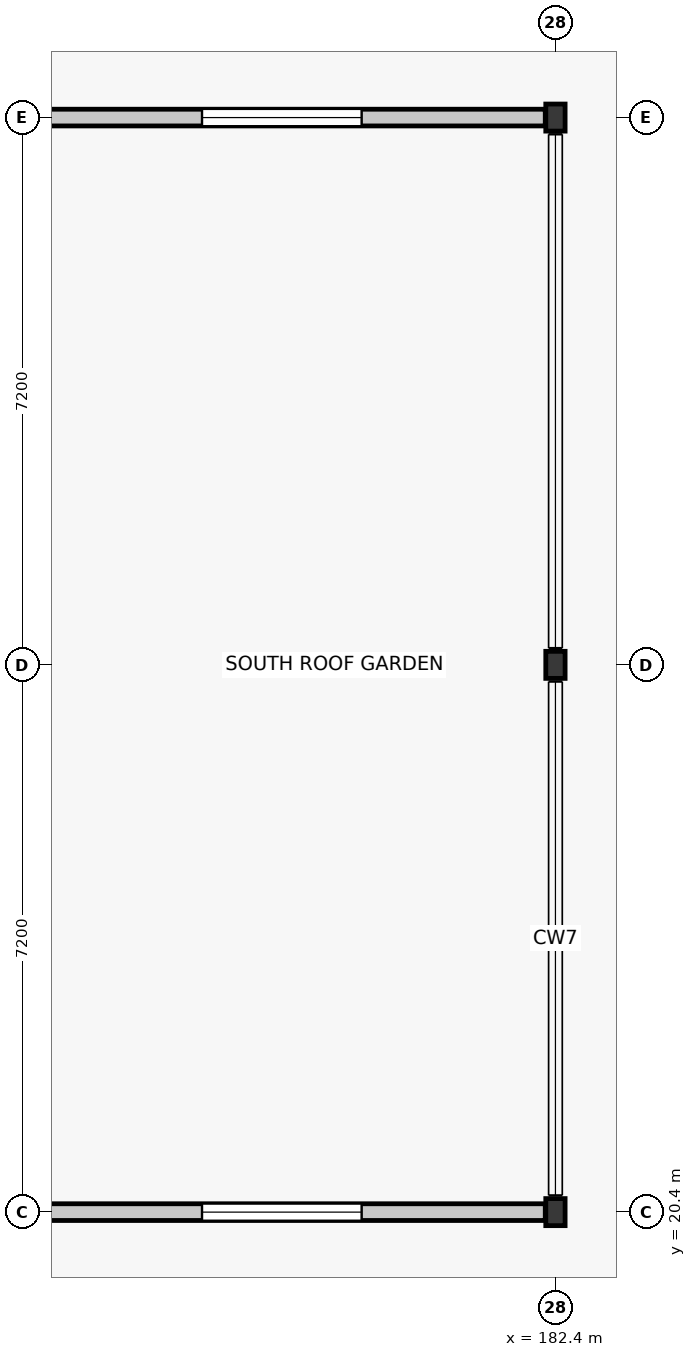
"""IFC4 building model, lengths in metres.
Left out: names, types, materials, properties, quantities, classifications, styles, units other than length and angle.
Written with IfcOpenShell. Run it as: python <this file> out.ifc"""

import sys

from ifc_helpers import new_model, si_unit, direction, frame, frame_2d, origin, origin_2d, place, context, subcontext, project, spatial, rectangle, i_section, extrude, element, fill, save


model = new_model("IFC4")
c1 = context("Model", 3, precision=1e-05, world=origin(), true_north=direction((0.0, 1.0)))
c2 = subcontext(c1, "Body", "Model", "MODEL_VIEW")
j1 = project(units=[si_unit("LENGTHUNIT", "METRE"), si_unit("PLANEANGLEUNIT", "RADIAN")], contexts=[c1])
p1 = place(None, origin())
s1 = spatial("IfcSite", under=j1, at=p1, CompositionType="ELEMENT")
p2 = place(p1, origin())
s2 = spatial("IfcBuilding", under=s1, at=p2, CompositionType="ELEMENT")
p3 = place(p2, frame((0.0, 0.0, 13.2)))
s3 = spatial("IfcBuildingStorey", under=s2, at=p3, CompositionType="ELEMENT", Elevation=13.2)
for number, where, z_axis, x_axis in (
    (1, (182.4, 20.4, 0.0), (0.0, 0.0, 1.0), (1.0, 0.0, 0.0)),
    (2, (182.4, 27.6, 0.0), (0.0, 0.0, 1.0), (1.0, 0.0, 0.0)),
    (3, (182.4, 34.8, 0.0), (0.0, 0.0, 1.0), (1.0, 0.0, 0.0)),
):
    element("IfcColumn", number, at=place(p3, frame(where, z_axis=z_axis, x_axis=x_axis)), inside=s3, PredefinedType="COLUMN", context=c2, shape_type="SweptSolid", body=[
        extrude(i_section(OverallWidth=0.254, OverallDepth=0.356, WebThickness=0.01, FlangeThickness=0.018, FilletRadius=0.015, at=origin_2d()), origin(), (0.0, 0.0, 1.0), 3.66),
    ])
p4 = place(p3, frame((182.266, 20.4, 0.0), z_axis=(0.0, 0.0, 1.0), x_axis=(-1.0, 0.0, 0.0)))
e4 = element("IfcWall", 4, at=p4, inside=s3, PredefinedType="STANDARD", context=c2, shape_type="SweptSolid", body=[
    extrude(rectangle(XDim=6.932, YDim=0.22, at=frame_2d((3.466, 0.0))), origin(), (0.0, 0.0, 1.0), 3.19),
])
p5 = place(p4, frame((2.416, 0.0, 0.95)))
e5 = element("IfcOpeningElement", 5, at=p5, cuts=e4, PredefinedType="OPENING", context=c2, shape_type="SweptSolid", body=[
    extrude(rectangle(XDim=2.1, YDim=1.5, at=frame_2d((1.05, 0.75))), frame((0.0, 0.12, 0.0), z_axis=(0.0, -1.0, 0.0), x_axis=(1.0, 0.0, 0.0)), (0.0, 0.0, 1.0), 0.24),
])
p6 = place(p3, frame((175.334, 34.8, 0.0), z_axis=(0.0, 0.0, 1.0), x_axis=(1.0, 0.0, 0.0)))
e6 = element("IfcWall", 6, at=p6, inside=s3, PredefinedType="STANDARD", context=c2, shape_type="SweptSolid", body=[
    extrude(rectangle(XDim=6.932, YDim=0.22, at=frame_2d((3.466, 0.0))), origin(), (0.0, 0.0, 1.0), 3.19),
])
p7 = place(p6, frame((2.416, 0.0, 0.95)))
e7 = element("IfcOpeningElement", 7, at=p7, cuts=e6, PredefinedType="OPENING", context=c2, shape_type="SweptSolid", body=[
    extrude(rectangle(XDim=2.1, YDim=1.5, at=frame_2d((1.05, 0.75))), frame((0.0, 0.12, 0.0), z_axis=(0.0, -1.0, 0.0), x_axis=(1.0, 0.0, 0.0)), (0.0, 0.0, 1.0), 0.24),
])
p8 = place(p5, origin())
e8 = element("IfcWindow", 8, at=p8, inside=s3, PartitioningType="SINGLE_PANEL", PredefinedType="WINDOW", context=c2, shape_type="SweptSolid", body=[
    extrude(rectangle(XDim=2.1, YDim=1.5, at=frame_2d((1.05, 0.75))), frame((0.0, 0.03, 0.0), z_axis=(0.0, -1.0, 0.0), x_axis=(1.0, 0.0, 0.0)), (0.0, 0.0, 1.0), 0.06),
])
fill(e5, e8)
p9 = place(p7, origin())
e9 = element("IfcWindow", 9, at=p9, inside=s3, PartitioningType="SINGLE_PANEL", PredefinedType="WINDOW", context=c2, shape_type="SweptSolid", body=[
    extrude(rectangle(XDim=2.1, YDim=1.5, at=frame_2d((1.05, 0.75))), frame((0.0, 0.03, 0.0), z_axis=(0.0, -1.0, 0.0), x_axis=(1.0, 0.0, 0.0)), (0.0, 0.0, 1.0), 0.06),
])
fill(e7, e9)
save(model, sys.argv[1])
